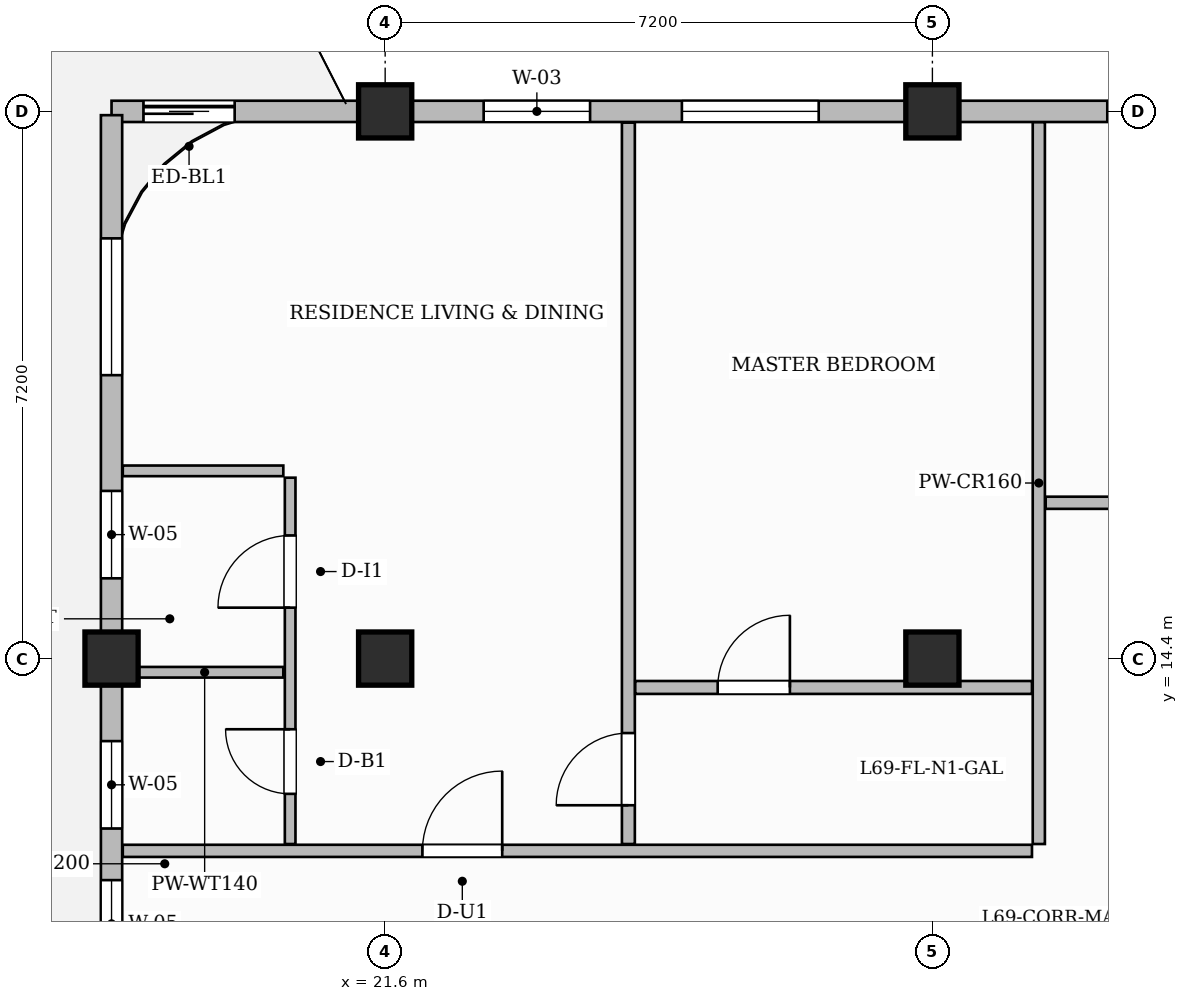
"""IFC4 building model, lengths in metres.
Left out: names, types, materials, properties, quantities, classifications, styles, units other than length and angle.
Written with IfcOpenShell. Run it as: python <this file> out.ifc"""

import sys

from ifc_helpers import new_model, si_unit, direction, frame, frame_2d, origin, origin_2d, place, context, subcontext, project, spatial, rectangle, extrude, source, transform, mapped, element, fill, save


model = new_model("IFC4")
c1 = context("Model", 3, precision=1e-05, world=origin(), true_north=direction((0.0, 1.0)))
c2 = subcontext(c1, "Body", "Model", "MODEL_VIEW")
j1 = project(units=[si_unit("LENGTHUNIT", "METRE"), si_unit("PLANEANGLEUNIT", "RADIAN")], contexts=[c1])
p1 = place(None, origin())
s1 = spatial("IfcSite", under=j1, at=p1, CompositionType="ELEMENT")
p2 = place(p1, origin())
s2 = spatial("IfcBuilding", under=s1, at=p2, CompositionType="ELEMENT")
p3 = place(p2, frame((0.0, 0.0, 275.05)))
s3 = spatial("IfcBuildingStorey", under=s2, at=p3, CompositionType="ELEMENT", Elevation=275.05)
m1 = source(origin(), c2, "Body", "SweptSolid", [
    extrude(rectangle(XDim=0.7, YDim=0.7, at=origin_2d()), origin(), (0.0, 0.0, 1.0), 3.85),
])
for number, where, z_axis, x_axis in (
    (1, (21.6, 14.4, 0.0), (0.0, 0.0, 1.0), (1.0, 0.0, 0.0)),
    (2, (21.6, 21.6, 0.0), (0.0, 0.0, 1.0), (1.0, 0.0, 0.0)),
    (3, (28.8, 14.4, 0.0), (0.0, 0.0, 1.0), (1.0, 0.0, 0.0)),
    (4, (28.8, 21.6, 0.0), (0.0, 0.0, 1.0), (1.0, 0.0, 0.0)),
    (5, (18.0, 14.4, 0.0), (0.0, 0.0, 1.0), (1.0, 0.0, 0.0)),
):
    element("IfcColumn", number, at=place(p3, frame(where, z_axis=z_axis, x_axis=x_axis)), inside=s3, PredefinedType="COLUMN", context=c2, shape_type="MappedRepresentation", body=[
        mapped(m1, transform((0.0, 0.0, 0.0), scale=1.0)),
    ])
p4 = place(p3, frame((18.148, 11.87, 0.0), z_axis=(0.0, 0.0, 1.0), x_axis=(1.0, 0.0, 0.0)))
e6 = element("IfcWall", 6, at=p4, inside=s3, PredefinedType="PARTITIONING", context=c2, shape_type="SweptSolid", body=[
    extrude(rectangle(XDim=11.962, YDim=0.16, at=frame_2d((5.981, 0.0))), origin(), (0.0, 0.0, 1.0), 3.6),
])
p5 = place(p4, frame((3.942, 0.0, 0.0)))
e7 = element("IfcOpeningElement", 7, at=p5, cuts=e6, PredefinedType="OPENING", context=c2, shape_type="SweptSolid", body=[
    extrude(rectangle(XDim=1.05, YDim=2.25, at=frame_2d((0.525, 1.125))), frame((0.0, 0.09, 0.0), z_axis=(0.0, -1.0, 0.0), x_axis=(1.0, 0.0, 0.0)), (0.0, 0.0, 1.0), 0.18),
])
p6 = place(p3, frame((30.2, 11.96, 0.0), z_axis=(0.0, 0.0, 1.0), x_axis=(0.0, 1.0, 0.0)))
e8 = element("IfcWall", 8, at=p6, inside=s3, PredefinedType="PARTITIONING", context=c2, shape_type="SweptSolid", body=[
    extrude(rectangle(XDim=9.5, YDim=0.16, at=frame_2d((4.75, 0.0))), origin(), (0.0, 0.0, 1.0), 3.6),
])
p7 = place(p3, frame((30.29, 16.45, 0.0), z_axis=(0.0, 0.0, 1.0), x_axis=(1.0, 0.0, 0.0)))
e9 = element("IfcWall", 9, at=p7, inside=s3, PredefinedType="PARTITIONING", context=c2, shape_type="SweptSolid", body=[
    extrude(rectangle(XDim=19.37, YDim=0.16, at=frame_2d((9.685, 0.0))), origin(), (0.0, 0.0, 1.0), 3.6),
])
p8 = place(p7, frame((1.285, 0.0, 0.0)))
e10 = element("IfcOpeningElement", 10, at=p8, cuts=e9, PredefinedType="OPENING", context=c2, shape_type="SweptSolid", body=[
    extrude(rectangle(XDim=0.85, YDim=2.1, at=frame_2d((0.425, 1.05))), frame((0.0, 0.09, 0.0), z_axis=(0.0, -1.0, 0.0), x_axis=(1.0, 0.0, 0.0)), (0.0, 0.0, 1.0), 0.18),
])
p9 = place(p7, frame((10.66, 0.0, 0.0)))
e11 = element("IfcOpeningElement", 11, at=p9, cuts=e9, PredefinedType="OPENING", context=c2, shape_type="SweptSolid", body=[
    extrude(rectangle(XDim=1.6, YDim=2.4, at=frame_2d((0.8, 1.2))), frame((0.0, 0.09, 0.0), z_axis=(0.0, -1.0, 0.0), x_axis=(1.0, 0.0, 0.0)), (0.0, 0.0, 1.0), 0.18),
])
p10 = place(p3, frame((20.35, 11.96, 0.0), z_axis=(0.0, 0.0, 1.0), x_axis=(0.0, 1.0, 0.0)))
e12 = element("IfcWall", 12, at=p10, inside=s3, PredefinedType="PARTITIONING", context=c2, shape_type="SweptSolid", body=[
    extrude(rectangle(XDim=4.82, YDim=0.14, at=frame_2d((2.41, 0.0))), origin(), (0.0, 0.0, 1.0), 3.6),
])
p11 = place(p10, frame((0.66, 0.0, 0.0)))
e13 = element("IfcOpeningElement", 13, at=p11, cuts=e12, PredefinedType="OPENING", context=c2, shape_type="SweptSolid", body=[
    extrude(rectangle(XDim=0.85, YDim=2.1, at=frame_2d((0.425, 1.05))), frame((0.0, 0.08, 0.0), z_axis=(0.0, -1.0, 0.0), x_axis=(1.0, 0.0, 0.0)), (0.0, 0.0, 1.0), 0.16),
])
p12 = place(p10, frame((3.11, 0.0, 0.0)))
e14 = element("IfcOpeningElement", 14, at=p12, cuts=e12, PredefinedType="OPENING", context=c2, shape_type="SweptSolid", body=[
    extrude(rectangle(XDim=0.95, YDim=2.15, at=frame_2d((0.475, 1.075))), frame((0.0, 0.08, 0.0), z_axis=(0.0, -1.0, 0.0), x_axis=(1.0, 0.0, 0.0)), (0.0, 0.0, 1.0), 0.16),
])
p13 = place(p3, frame((18.19, 14.22, 0.0), z_axis=(0.0, 0.0, 1.0), x_axis=(1.0, 0.0, 0.0)))
e15 = element("IfcWall", 15, at=p13, inside=s3, PredefinedType="PARTITIONING", context=c2, shape_type="SweptSolid", body=[
    extrude(rectangle(XDim=2.07, YDim=0.14, at=frame_2d((1.035, 0.0))), origin(), (0.0, 0.0, 1.0), 3.185),
])
p14 = place(p3, frame((18.148, 16.87, 0.0), z_axis=(0.0, 0.0, 1.0), x_axis=(1.0, 0.0, 0.0)))
e16 = element("IfcWall", 16, at=p14, inside=s3, PredefinedType="PARTITIONING", context=c2, shape_type="SweptSolid", body=[
    extrude(rectangle(XDim=2.112, YDim=0.14, at=frame_2d((1.056, 0.0))), origin(), (0.0, 0.0, 1.0), 3.6),
])
p15 = place(p3, frame((24.8, 11.96, 0.0), z_axis=(0.0, 0.0, 1.0), x_axis=(0.0, 1.0, 0.0)))
e17 = element("IfcWall", 17, at=p15, inside=s3, PredefinedType="PARTITIONING", context=c2, shape_type="SweptSolid", body=[
    extrude(rectangle(XDim=9.492, YDim=0.17, at=frame_2d((4.746, 0.0))), origin(), (0.0, 0.0, 1.0), 3.6),
])
p16 = place(p15, frame((0.51, 0.0, 0.0)))
e18 = element("IfcOpeningElement", 18, at=p16, cuts=e17, PredefinedType="OPENING", context=c2, shape_type="SweptSolid", body=[
    extrude(rectangle(XDim=0.95, YDim=2.15, at=frame_2d((0.475, 1.075))), frame((0.0, 0.095, 0.0), z_axis=(0.0, -1.0, 0.0), x_axis=(1.0, 0.0, 0.0)), (0.0, 0.0, 1.0), 0.19),
])
p17 = place(p3, frame((24.89, 14.02, 0.0), z_axis=(0.0, 0.0, 1.0), x_axis=(1.0, 0.0, 0.0)))
e19 = element("IfcWall", 19, at=p17, inside=s3, PredefinedType="PARTITIONING", context=c2, shape_type="SweptSolid", body=[
    extrude(rectangle(XDim=5.22, YDim=0.17, at=frame_2d((2.61, 0.0))), origin(), (0.0, 0.0, 1.0), 3.6),
])
p18 = place(p17, frame((1.085, 0.0, 0.0)))
e20 = element("IfcOpeningElement", 20, at=p18, cuts=e19, PredefinedType="OPENING", context=c2, shape_type="SweptSolid", body=[
    extrude(rectangle(XDim=0.95, YDim=2.15, at=frame_2d((0.475, 1.075))), frame((0.0, 0.095, 0.0), z_axis=(0.0, -1.0, 0.0), x_axis=(1.0, 0.0, 0.0)), (0.0, 0.0, 1.0), 0.19),
])
p19 = place(p3, frame((18.0, 21.6, 0.0), z_axis=(0.0, 0.0, 1.0), x_axis=(1.0, 0.0, 0.0)))
e21 = element("IfcWall", 21, at=p19, inside=s3, PredefinedType="SOLIDWALL", context=c2, shape_type="SweptSolid", body=[
    extrude(rectangle(XDim=31.8, YDim=0.28, at=frame_2d((15.9, 0.0))), origin(), (0.0, 0.0, 1.0), 3.185),
])
p20 = place(p19, frame((0.42, 0.0, 0.0)))
e22 = element("IfcOpeningElement", 22, at=p20, cuts=e21, PredefinedType="OPENING", context=c2, shape_type="SweptSolid", body=[
    extrude(rectangle(XDim=1.2, YDim=2.2, at=frame_2d((0.6, 1.1))), frame((0.0, 0.15, 0.0), z_axis=(0.0, -1.0, 0.0), x_axis=(1.0, 0.0, 0.0)), (0.0, 0.0, 1.0), 0.3),
])
p21 = place(p19, frame((4.896, 0.0, 0.8)))
e23 = element("IfcOpeningElement", 23, at=p21, cuts=e21, PredefinedType="OPENING", context=c2, shape_type="SweptSolid", body=[
    extrude(rectangle(XDim=1.4, YDim=1.85, at=frame_2d((0.7, 0.925))), frame((0.0, 0.15, 0.0), z_axis=(0.0, -1.0, 0.0), x_axis=(1.0, 0.0, 0.0)), (0.0, 0.0, 1.0), 0.3),
])
p22 = place(p19, frame((7.504, 0.0, 0.8)))
e24 = element("IfcOpeningElement", 24, at=p22, cuts=e21, PredefinedType="OPENING", context=c2, shape_type="SweptSolid", body=[
    extrude(rectangle(XDim=1.8, YDim=1.85, at=frame_2d((0.9, 0.925))), frame((0.0, 0.15, 0.0), z_axis=(0.0, -1.0, 0.0), x_axis=(1.0, 0.0, 0.0)), (0.0, 0.0, 1.0), 0.3),
])
p23 = place(p19, frame((13.101, 0.0, 0.8)))
e25 = element("IfcOpeningElement", 25, at=p23, cuts=e21, PredefinedType="OPENING", context=c2, shape_type="SweptSolid", body=[
    extrude(rectangle(XDim=1.8, YDim=1.85, at=frame_2d((0.9, 0.925))), frame((0.0, 0.15, 0.0), z_axis=(0.0, -1.0, 0.0), x_axis=(1.0, 0.0, 0.0)), (0.0, 0.0, 1.0), 0.3),
])
p24 = place(p19, frame((18.125, 0.0, 0.8)))
e26 = element("IfcOpeningElement", 26, at=p24, cuts=e21, PredefinedType="OPENING", context=c2, shape_type="SweptSolid", body=[
    extrude(rectangle(XDim=1.8, YDim=1.85, at=frame_2d((0.9, 0.925))), frame((0.0, 0.15, 0.0), z_axis=(0.0, -1.0, 0.0), x_axis=(1.0, 0.0, 0.0)), (0.0, 0.0, 1.0), 0.3),
])
p25 = place(p19, frame((20.875, 0.0, 0.8)))
e27 = element("IfcOpeningElement", 27, at=p25, cuts=e21, PredefinedType="OPENING", context=c2, shape_type="SweptSolid", body=[
    extrude(rectangle(XDim=1.8, YDim=1.85, at=frame_2d((0.9, 0.925))), frame((0.0, 0.15, 0.0), z_axis=(0.0, -1.0, 0.0), x_axis=(1.0, 0.0, 0.0)), (0.0, 0.0, 1.0), 0.3),
])
p26 = place(p19, frame((25.475, 0.0, 0.8)))
e28 = element("IfcOpeningElement", 28, at=p26, cuts=e21, PredefinedType="OPENING", context=c2, shape_type="SweptSolid", body=[
    extrude(rectangle(XDim=1.8, YDim=1.85, at=frame_2d((0.9, 0.925))), frame((0.0, 0.15, 0.0), z_axis=(0.0, -1.0, 0.0), x_axis=(1.0, 0.0, 0.0)), (0.0, 0.0, 1.0), 0.3),
])
p27 = place(p19, frame((28.525, 0.0, 0.8)))
e29 = element("IfcOpeningElement", 29, at=p27, cuts=e21, PredefinedType="OPENING", context=c2, shape_type="SweptSolid", body=[
    extrude(rectangle(XDim=1.8, YDim=1.85, at=frame_2d((0.9, 0.925))), frame((0.0, 0.15, 0.0), z_axis=(0.0, -1.0, 0.0), x_axis=(1.0, 0.0, 0.0)), (0.0, 0.0, 1.0), 0.3),
])
p28 = place(p3, frame((18.0, 0.05, 0.0), z_axis=(0.0, 0.0, 1.0), x_axis=(0.0, 1.0, 0.0)))
e30 = element("IfcWall", 30, at=p28, inside=s3, PredefinedType="SOLIDWALL", context=c2, shape_type="SweptSolid", body=[
    extrude(rectangle(XDim=21.5, YDim=0.28, at=frame_2d((10.75, 0.0))), origin(), (0.0, 0.0, 1.0), 3.6),
])
p29 = place(p28, frame((0.99, 0.0, 0.8)))
e31 = element("IfcOpeningElement", 31, at=p29, cuts=e30, PredefinedType="OPENING", context=c2, shape_type="SweptSolid", body=[
    extrude(rectangle(XDim=1.8, YDim=1.85, at=frame_2d((0.9, 0.925))), frame((0.0, 0.15, 0.0), z_axis=(0.0, -1.0, 0.0), x_axis=(1.0, 0.0, 0.0)), (0.0, 0.0, 1.0), 0.3),
])
p30 = place(p28, frame((3.93, 0.0, 0.8)))
e32 = element("IfcOpeningElement", 32, at=p30, cuts=e30, PredefinedType="OPENING", context=c2, shape_type="SweptSolid", body=[
    extrude(rectangle(XDim=1.8, YDim=1.85, at=frame_2d((0.9, 0.925))), frame((0.0, 0.15, 0.0), z_axis=(0.0, -1.0, 0.0), x_axis=(1.0, 0.0, 0.0)), (0.0, 0.0, 1.0), 0.3),
])
p31 = place(p28, frame((8.346, 0.0, 0.8)))
e33 = element("IfcOpeningElement", 33, at=p31, cuts=e30, PredefinedType="OPENING", context=c2, shape_type="SweptSolid", body=[
    extrude(rectangle(XDim=1.15, YDim=1.8, at=frame_2d((0.575, 0.9))), frame((0.0, 0.15, 0.0), z_axis=(0.0, -1.0, 0.0), x_axis=(1.0, 0.0, 0.0)), (0.0, 0.0, 1.0), 0.3),
])
p32 = place(p28, frame((10.285, 0.0, 0.8)))
e34 = element("IfcOpeningElement", 34, at=p32, cuts=e30, PredefinedType="OPENING", context=c2, shape_type="SweptSolid", body=[
    extrude(rectangle(XDim=1.15, YDim=1.8, at=frame_2d((0.575, 0.9))), frame((0.0, 0.15, 0.0), z_axis=(0.0, -1.0, 0.0), x_axis=(1.0, 0.0, 0.0)), (0.0, 0.0, 1.0), 0.3),
])
p33 = place(p28, frame((12.114, 0.0, 0.8)))
e35 = element("IfcOpeningElement", 35, at=p33, cuts=e30, PredefinedType="OPENING", context=c2, shape_type="SweptSolid", body=[
    extrude(rectangle(XDim=1.15, YDim=1.8, at=frame_2d((0.575, 0.9))), frame((0.0, 0.15, 0.0), z_axis=(0.0, -1.0, 0.0), x_axis=(1.0, 0.0, 0.0)), (0.0, 0.0, 1.0), 0.3),
])
p34 = place(p28, frame((15.406, 0.0, 0.8)))
e36 = element("IfcOpeningElement", 36, at=p34, cuts=e30, PredefinedType="OPENING", context=c2, shape_type="SweptSolid", body=[
    extrude(rectangle(XDim=1.15, YDim=1.8, at=frame_2d((0.575, 0.9))), frame((0.0, 0.15, 0.0), z_axis=(0.0, -1.0, 0.0), x_axis=(1.0, 0.0, 0.0)), (0.0, 0.0, 1.0), 0.3),
])
p35 = place(p28, frame((18.079, 0.0, 0.8)))
e37 = element("IfcOpeningElement", 37, at=p35, cuts=e30, PredefinedType="OPENING", context=c2, shape_type="SweptSolid", body=[
    extrude(rectangle(XDim=1.8, YDim=1.85, at=frame_2d((0.9, 0.925))), frame((0.0, 0.15, 0.0), z_axis=(0.0, -1.0, 0.0), x_axis=(1.0, 0.0, 0.0)), (0.0, 0.0, 1.0), 0.3),
])
m2 = source(origin(), c2, "Body", "SweptSolid", [
    extrude(rectangle(XDim=0.85, YDim=2.1, at=frame_2d((0.425, 1.05))), frame((0.0, 0.025, 0.0), z_axis=(0.0, -1.0, 0.0), x_axis=(1.0, 0.0, 0.0)), (0.0, 0.0, 1.0), 0.05),
])
p36 = place(p11, origin())
e38 = element("IfcDoor", 38, at=p36, inside=s3, OperationType="SINGLE_SWING_RIGHT", PredefinedType="DOOR", context=c2, shape_type="MappedRepresentation", body=[
    mapped(m2, transform((0.0, 0.0, 0.0), scale=1.0)),
])
fill(e13, e38)
m3 = source(origin(), c2, "Body", "SweptSolid", [
    extrude(rectangle(XDim=0.95, YDim=2.15, at=frame_2d((0.475, 1.075))), frame((0.0, 0.025, 0.0), z_axis=(0.0, -1.0, 0.0), x_axis=(1.0, 0.0, 0.0)), (0.0, 0.0, 1.0), 0.05),
])
p37 = place(p12, origin())
e39 = element("IfcDoor", 39, at=p37, inside=s3, OperationType="SINGLE_SWING_LEFT", PredefinedType="DOOR", context=c2, shape_type="MappedRepresentation", body=[
    mapped(m3, transform((0.0, 0.0, 0.0), scale=1.0)),
])
fill(e14, e39)
m4 = source(origin(), c2, "Body", "SweptSolid", [
    extrude(rectangle(XDim=1.05, YDim=2.25, at=frame_2d((0.525, 1.125))), frame((0.0, 0.025, 0.0), z_axis=(0.0, -1.0, 0.0), x_axis=(1.0, 0.0, 0.0)), (0.0, 0.0, 1.0), 0.05),
])
p38 = place(p5, origin())
e40 = element("IfcDoor", 40, at=p38, inside=s3, OperationType="SINGLE_SWING_RIGHT", PredefinedType="DOOR", context=c2, shape_type="MappedRepresentation", body=[
    mapped(m4, transform((0.0, 0.0, 0.0), scale=1.0)),
])
fill(e7, e40)
p39 = place(p16, origin())
e41 = element("IfcDoor", 41, at=p39, inside=s3, OperationType="SINGLE_SWING_LEFT", PredefinedType="DOOR", context=c2, shape_type="MappedRepresentation", body=[
    mapped(m3, transform((0.0, 0.0, 0.0), scale=1.0)),
])
fill(e18, e41)
p40 = place(p18, origin())
e42 = element("IfcDoor", 42, at=p40, inside=s3, OperationType="SINGLE_SWING_RIGHT", PredefinedType="DOOR", context=c2, shape_type="MappedRepresentation", body=[
    mapped(m3, transform((0.0, 0.0, 0.0), scale=1.0)),
])
fill(e20, e42)
m5 = source(origin(), c2, "Body", "SweptSolid", [
    extrude(rectangle(XDim=1.2, YDim=2.2, at=frame_2d((0.6, 1.1))), frame((0.0, 0.025, 0.0), z_axis=(0.0, -1.0, 0.0), x_axis=(1.0, 0.0, 0.0)), (0.0, 0.0, 1.0), 0.05),
])
p41 = place(p20, origin())
e43 = element("IfcDoor", 43, at=p41, inside=s3, OperationType="SLIDING_TO_LEFT", PredefinedType="DOOR", context=c2, shape_type="MappedRepresentation", body=[
    mapped(m5, transform((0.0, 0.0, 0.0), scale=1.0)),
])
fill(e22, e43)
m6 = source(origin(), c2, "Body", "SweptSolid", [
    extrude(rectangle(XDim=1.4, YDim=1.85, at=frame_2d((0.7, 0.925))), frame((0.0, 0.03, 0.0), z_axis=(0.0, -1.0, 0.0), x_axis=(1.0, 0.0, 0.0)), (0.0, 0.0, 1.0), 0.06),
])
p42 = place(p21, origin())
e44 = element("IfcWindow", 44, at=p42, inside=s3, PartitioningType="SINGLE_PANEL", PredefinedType="WINDOW", context=c2, shape_type="MappedRepresentation", body=[
    mapped(m6, transform((0.0, 0.0, 0.0), scale=1.0)),
])
fill(e23, e44)
m7 = source(origin(), c2, "Body", "SweptSolid", [
    extrude(rectangle(XDim=1.8, YDim=1.85, at=frame_2d((0.9, 0.925))), frame((0.0, 0.03, 0.0), z_axis=(0.0, -1.0, 0.0), x_axis=(1.0, 0.0, 0.0)), (0.0, 0.0, 1.0), 0.06),
])
p43 = place(p22, origin())
e45 = element("IfcWindow", 45, at=p43, inside=s3, PartitioningType="DOUBLE_PANEL_VERTICAL", PredefinedType="WINDOW", context=c2, shape_type="MappedRepresentation", body=[
    mapped(m7, transform((0.0, 0.0, 0.0), scale=1.0)),
])
fill(e24, e45)
p44 = place(p23, origin())
e46 = element("IfcWindow", 46, at=p44, inside=s3, PartitioningType="DOUBLE_PANEL_VERTICAL", PredefinedType="WINDOW", context=c2, shape_type="MappedRepresentation", body=[
    mapped(m7, transform((0.0, 0.0, 0.0), scale=1.0)),
])
fill(e25, e46)
m8 = source(origin(), c2, "Body", "SweptSolid", [
    extrude(rectangle(XDim=1.15, YDim=1.8, at=frame_2d((0.575, 0.9))), frame((0.0, 0.03, 0.0), z_axis=(0.0, -1.0, 0.0), x_axis=(1.0, 0.0, 0.0)), (0.0, 0.0, 1.0), 0.06),
])
p45 = place(p32, origin())
e47 = element("IfcWindow", 47, at=p45, inside=s3, PartitioningType="SINGLE_PANEL", PredefinedType="WINDOW", context=c2, shape_type="MappedRepresentation", body=[
    mapped(m8, transform((0.0, 0.0, 0.0), scale=1.0)),
])
fill(e34, e47)
p46 = place(p33, origin())
e48 = element("IfcWindow", 48, at=p46, inside=s3, PartitioningType="SINGLE_PANEL", PredefinedType="WINDOW", context=c2, shape_type="MappedRepresentation", body=[
    mapped(m8, transform((0.0, 0.0, 0.0), scale=1.0)),
])
fill(e35, e48)
p47 = place(p34, origin())
e49 = element("IfcWindow", 49, at=p47, inside=s3, PartitioningType="SINGLE_PANEL", PredefinedType="WINDOW", context=c2, shape_type="MappedRepresentation", body=[
    mapped(m8, transform((0.0, 0.0, 0.0), scale=1.0)),
])
fill(e36, e49)
p48 = place(p35, origin())
e50 = element("IfcWindow", 50, at=p48, inside=s3, PartitioningType="DOUBLE_PANEL_VERTICAL", PredefinedType="WINDOW", context=c2, shape_type="MappedRepresentation", body=[
    mapped(m7, transform((0.0, 0.0, 0.0), scale=1.0)),
])
fill(e37, e50)
save(model, sys.argv[1])
